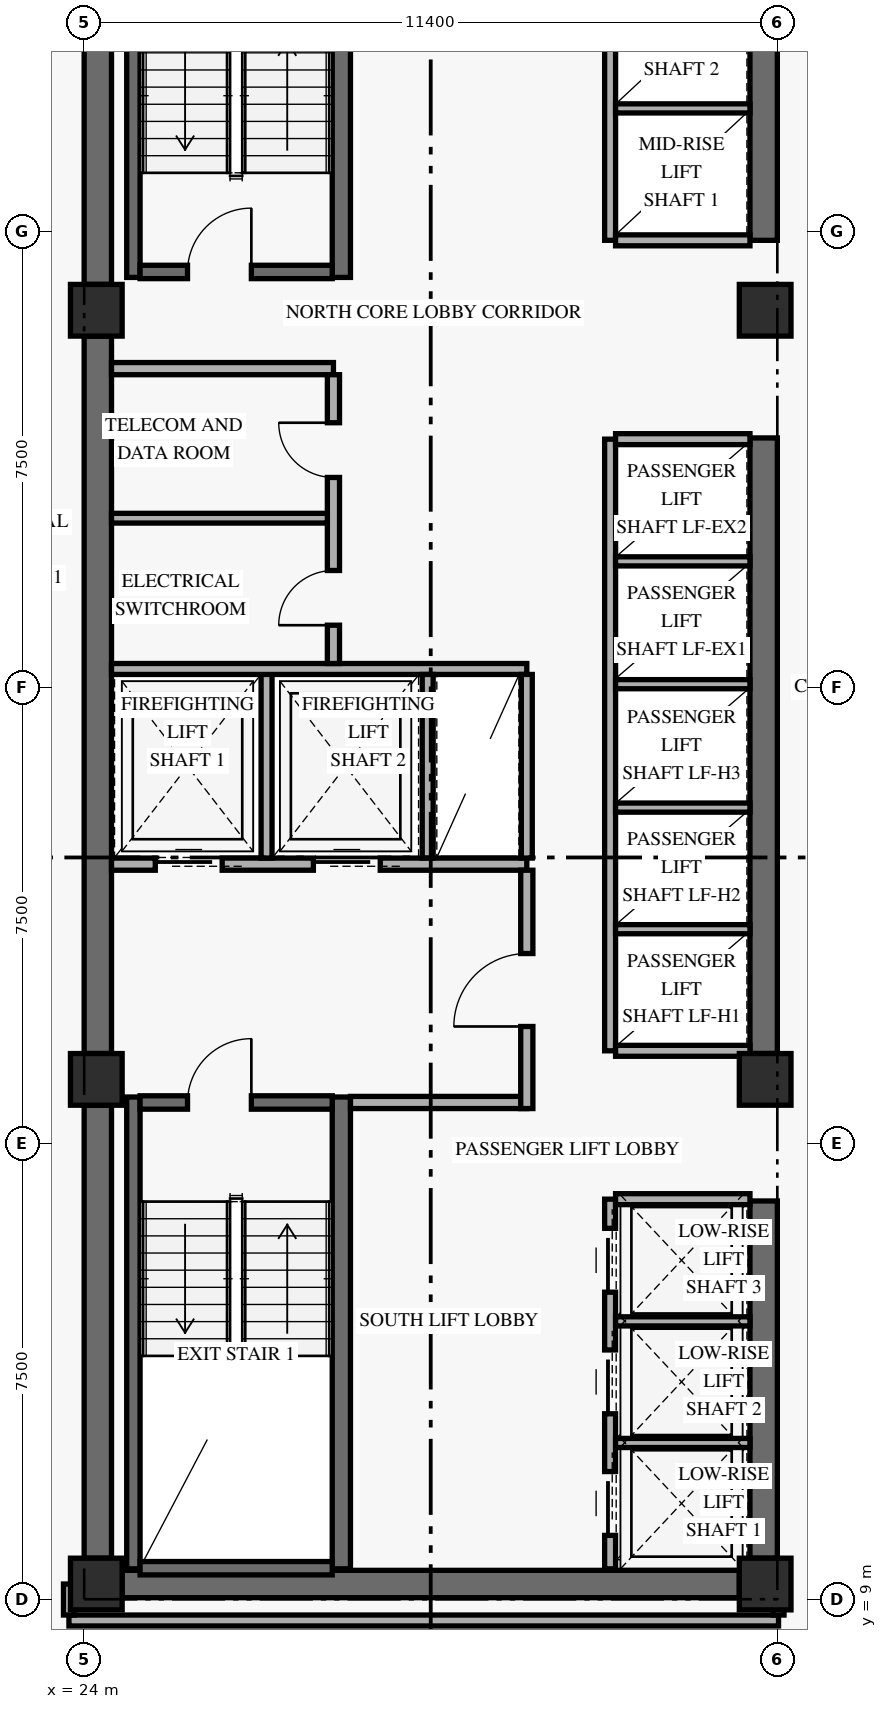
"""IFC4 building model, lengths in metres.
Left out: names, types, materials, properties, quantities, classifications, styles, units other than length and angle.
Written with IfcOpenShell. Run it as: python <this file> out.ifc"""

import sys

from ifc_helpers import new_model, si_unit, direction, frame, frame_2d, origin, origin_2d, place, context, subcontext, project, spatial, rectangle, extrude, element, fill, save


model = new_model("IFC4")
c1 = context("Model", 3, precision=1e-05, world=origin(), true_north=direction((0.0, 1.0)))
c2 = subcontext(c1, "Body", "Model", "MODEL_VIEW")
j1 = project(units=[si_unit("LENGTHUNIT", "METRE"), si_unit("PLANEANGLEUNIT", "RADIAN")], contexts=[c1])
p1 = place(None, origin())
s1 = spatial("IfcSite", under=j1, at=p1, CompositionType="ELEMENT")
p2 = place(p1, origin())
s2 = spatial("IfcBuilding", under=s1, at=p2, CompositionType="ELEMENT")
p3 = place(p2, frame((0.0, 0.0, 87.6)))
s3 = spatial("IfcBuildingStorey", under=s2, at=p3, CompositionType="ELEMENT", Elevation=87.6)
p4 = place(p3, frame((24.225, 9.675, 0.0), z_axis=(0.0, 0.0, 1.0), x_axis=(0.0, 1.0, 0.0)))
e1 = element("IfcWall", 1, at=p4, inside=s3, PredefinedType="SHEAR", context=c2, shape_type="SweptSolid", body=[
    extrude(rectangle(XDim=7.45, YDim=0.45, at=frame_2d((3.725, 0.0))), origin(), (0.0, 0.0, 1.0), 2.749),
])
p5 = place(p3, frame((24.225, 17.975, 0.0), z_axis=(0.0, 0.0, 1.0), x_axis=(0.0, 1.0, 0.0)))
e2 = element("IfcWall", 2, at=p5, inside=s3, PredefinedType="SHEAR", context=c2, shape_type="SweptSolid", body=[
    extrude(rectangle(XDim=11.8, YDim=0.45, at=frame_2d((5.9, 0.0))), origin(), (0.0, 0.0, 1.0), 2.749),
])
p6 = place(p3, frame((24.225, 30.625, 0.0), z_axis=(0.0, 0.0, 1.0), x_axis=(0.0, 1.0, 0.0)))
e3 = element("IfcWall", 3, at=p6, inside=s3, PredefinedType="SHEAR", context=c2, shape_type="SweptSolid", body=[
    extrude(rectangle(XDim=7.7, YDim=0.45, at=frame_2d((3.85, 0.0))), origin(), (0.0, 0.0, 1.0), 2.749),
])
p7 = place(p3, frame((35.175, 9.675, 0.0), z_axis=(0.0, 0.0, 1.0), x_axis=(0.0, 1.0, 0.0)))
e4 = element("IfcWall", 4, at=p7, inside=s3, PredefinedType="SHEAR", context=c2, shape_type="SweptSolid", body=[
    extrude(rectangle(XDim=5.875, YDim=0.45, at=frame_2d((2.938, 0.0))), origin(), (0.0, 0.0, 1.0), 2.749),
])
p8 = place(p3, frame((35.175, 17.975, 0.0), z_axis=(0.0, 0.0, 1.0), x_axis=(0.0, 1.0, 0.0)))
e5 = element("IfcWall", 5, at=p8, inside=s3, PredefinedType="SHEAR", context=c2, shape_type="SweptSolid", body=[
    extrude(rectangle(XDim=10.125, YDim=0.45, at=frame_2d((5.062, 0.0))), origin(), (0.0, 0.0, 1.0), 2.749),
])
p9 = place(p3, frame((35.175, 31.35, 0.0), z_axis=(0.0, 0.0, 1.0), x_axis=(0.0, 1.0, 0.0)))
e6 = element("IfcWall", 6, at=p9, inside=s3, PredefinedType="SHEAR", context=c2, shape_type="SweptSolid", body=[
    extrude(rectangle(XDim=6.975, YDim=0.45, at=frame_2d((3.487, 0.0))), origin(), (0.0, 0.0, 1.0), 2.749),
])
p10 = place(p3, frame((24.625, 9.25, 0.0), z_axis=(0.0, 0.0, 1.0), x_axis=(1.0, 0.0, 0.0)))
e7 = element("IfcWall", 7, at=p10, inside=s3, PredefinedType="SHEAR", context=c2, shape_type="SweptSolid", body=[
    extrude(rectangle(XDim=10.15, YDim=0.45, at=frame_2d((5.075, 0.0))), origin(), (0.0, 0.0, 1.0), 3.36),
])
p11 = place(p3, frame((24.81, 9.5, 0.0), z_axis=(0.0, 0.0, 1.0), x_axis=(0.0, 1.0, 0.0)))
e8 = element("IfcWall", 8, at=p11, inside=s3, PredefinedType="SHEAR", context=c2, shape_type="SweptSolid", body=[
    extrude(rectangle(XDim=7.76, YDim=0.22, at=frame_2d((3.88, 0.0))), origin(), (0.0, 0.0, 1.0), 3.36),
])
p12 = place(p3, frame((28.23, 9.5, 0.0), z_axis=(0.0, 0.0, 1.0), x_axis=(0.0, 1.0, 0.0)))
e9 = element("IfcWall", 9, at=p12, inside=s3, PredefinedType="SHEAR", context=c2, shape_type="SweptSolid", body=[
    extrude(rectangle(XDim=7.76, YDim=0.3, at=frame_2d((3.88, 0.0))), origin(), (0.0, 0.0, 1.0), 3.36),
])
p13 = place(p3, frame((24.92, 9.51, 0.0), z_axis=(0.0, 0.0, 1.0), x_axis=(1.0, 0.0, 0.0)))
e10 = element("IfcWall", 10, at=p13, inside=s3, PredefinedType="SHEAR", context=c2, shape_type="SweptSolid", body=[
    extrude(rectangle(XDim=3.16, YDim=0.22, at=frame_2d((1.58, 0.0))), origin(), (0.0, 0.0, 1.0), 3.36),
])
p14 = place(p3, frame((24.92, 17.17, 0.0), z_axis=(0.0, 0.0, 1.0), x_axis=(1.0, 0.0, 0.0)))
e11 = element("IfcWall", 11, at=p14, inside=s3, PredefinedType="SHEAR", context=c2, shape_type="SweptSolid", body=[
    extrude(rectangle(XDim=3.16, YDim=0.22, at=frame_2d((1.58, 0.0))), origin(), (0.0, 0.0, 1.0), 3.36),
])
p15 = place(p14, frame((0.78, 0.0, 0.0)))
e12 = element("IfcOpeningElement", 12, at=p15, cuts=e11, PredefinedType="OPENING", context=c2, shape_type="SweptSolid", body=[
    extrude(rectangle(XDim=1.05, YDim=2.15, at=frame_2d((0.525, 1.075))), frame((0.0, 0.12, 0.0), z_axis=(0.0, -1.0, 0.0), x_axis=(1.0, 0.0, 0.0)), (0.0, 0.0, 1.0), 0.24),
])
p16 = place(p3, frame((24.81, 30.74, 0.0), z_axis=(0.0, 0.0, 1.0), x_axis=(0.0, 1.0, 0.0)))
e13 = element("IfcWall", 13, at=p16, inside=s3, PredefinedType="SHEAR", context=c2, shape_type="SweptSolid", body=[
    extrude(rectangle(XDim=7.76, YDim=0.22, at=frame_2d((3.88, 0.0))), origin(), (0.0, 0.0, 1.0), 3.36),
])
p17 = place(p3, frame((28.23, 30.74, 0.0), z_axis=(0.0, 0.0, 1.0), x_axis=(0.0, 1.0, 0.0)))
e14 = element("IfcWall", 14, at=p17, inside=s3, PredefinedType="SHEAR", context=c2, shape_type="SweptSolid", body=[
    extrude(rectangle(XDim=7.76, YDim=0.3, at=frame_2d((3.88, 0.0))), origin(), (0.0, 0.0, 1.0), 3.36),
])
p18 = place(p3, frame((24.92, 30.83, 0.0), z_axis=(0.0, 0.0, 1.0), x_axis=(1.0, 0.0, 0.0)))
e15 = element("IfcWall", 15, at=p18, inside=s3, PredefinedType="SHEAR", context=c2, shape_type="SweptSolid", body=[
    extrude(rectangle(XDim=3.16, YDim=0.22, at=frame_2d((1.58, 0.0))), origin(), (0.0, 0.0, 1.0), 3.36),
])
p19 = place(p18, frame((0.78, 0.0, 0.0)))
e16 = element("IfcOpeningElement", 16, at=p19, cuts=e15, PredefinedType="OPENING", context=c2, shape_type="SweptSolid", body=[
    extrude(rectangle(XDim=1.05, YDim=2.15, at=frame_2d((0.525, 1.075))), frame((0.0, 0.12, 0.0), z_axis=(0.0, -1.0, 0.0), x_axis=(1.0, 0.0, 0.0)), (0.0, 0.0, 1.0), 0.24),
])
for number, where, z_axis, x_axis in (
    (17, (24.2, 9.25, 0.0), (0.0, 0.0, 1.0), (1.0, 0.0, 0.0)),
    (18, (24.2, 17.55, 0.0), (0.0, 0.0, 1.0), (1.0, 0.0, 0.0)),
    (19, (24.2, 30.2, 0.0), (0.0, 0.0, 1.0), (1.0, 0.0, 0.0)),
    (20, (35.2, 9.25, 0.0), (0.0, 0.0, 1.0), (1.0, 0.0, 0.0)),
    (21, (35.2, 17.55, 0.0), (0.0, 0.0, 1.0), (1.0, 0.0, 0.0)),
    (22, (35.2, 30.2, 0.0), (0.0, 0.0, 1.0), (1.0, 0.0, 0.0)),
):
    element("IfcColumn", number, at=place(p3, frame(where, z_axis=z_axis, x_axis=x_axis)), inside=s3, PredefinedType="COLUMN", context=c2, shape_type="SweptSolid", body=[
        extrude(rectangle(XDim=0.85, YDim=0.85, at=origin_2d()), origin(), (0.0, 0.0, 1.0), 3.6),
    ])
p20 = place(p3, frame((24.45, 21.09, 0.0), z_axis=(0.0, 0.0, 1.0), x_axis=(1.0, 0.0, 0.0)))
e23 = element("IfcWall", 23, at=p20, inside=s3, PredefinedType="STANDARD", context=c2, shape_type="SweptSolid", body=[
    extrude(rectangle(XDim=6.83, YDim=0.2, at=frame_2d((3.415, 0.0))), origin(), (0.0, 0.0, 1.0), 3.36),
])
p21 = place(p20, frame((0.72, 0.0, 0.0)))
e24 = element("IfcOpeningElement", 24, at=p21, cuts=e23, PredefinedType="OPENING", context=c2, shape_type="SweptSolid", body=[
    extrude(rectangle(XDim=1.1, YDim=2.2, at=frame_2d((0.55, 1.1))), frame((0.0, 0.11, 0.0), z_axis=(0.0, -1.0, 0.0), x_axis=(1.0, 0.0, 0.0)), (0.0, 0.0, 1.0), 0.22),
])
p22 = place(p20, frame((3.32, 0.0, 0.0)))
e25 = element("IfcOpeningElement", 25, at=p22, cuts=e23, PredefinedType="OPENING", context=c2, shape_type="SweptSolid", body=[
    extrude(rectangle(XDim=1.1, YDim=2.2, at=frame_2d((0.55, 1.1))), frame((0.0, 0.11, 0.0), z_axis=(0.0, -1.0, 0.0), x_axis=(1.0, 0.0, 0.0)), (0.0, 0.0, 1.0), 0.22),
])
p23 = place(p3, frame((28.38, 17.17, 0.0), z_axis=(0.0, 0.0, 1.0), x_axis=(1.0, 0.0, 0.0)))
e26 = element("IfcWall", 26, at=p23, inside=s3, PredefinedType="STANDARD", context=c2, shape_type="SweptSolid", body=[
    extrude(rectangle(XDim=2.9, YDim=0.2, at=frame_2d((1.45, 0.0))), origin(), (0.0, 0.0, 1.0), 3.36),
])
p24 = place(p3, frame((31.28, 17.07, 0.0), z_axis=(0.0, 0.0, 1.0), x_axis=(0.0, 1.0, 0.0)))
e27 = element("IfcWall", 27, at=p24, inside=s3, PredefinedType="STANDARD", context=c2, shape_type="SweptSolid", body=[
    extrude(rectangle(XDim=3.92, YDim=0.2, at=frame_2d((1.96, 0.0))), origin(), (0.0, 0.0, 1.0), 2.731),
])
p25 = place(p24, frame((1.35, 0.0, 0.0)))
e28 = element("IfcOpeningElement", 28, at=p25, cuts=e27, PredefinedType="OPENING", context=c2, shape_type="SweptSolid", body=[
    extrude(rectangle(XDim=1.2, YDim=2.15, at=frame_2d((0.6, 1.075))), frame((0.0, 0.11, 0.0), z_axis=(0.0, -1.0, 0.0), x_axis=(1.0, 0.0, 0.0)), (0.0, 0.0, 1.0), 0.22),
])
p26 = place(p3, frame((27.0, 21.19, 0.0), z_axis=(0.0, 0.0, 1.0), x_axis=(0.0, 1.0, 0.0)))
e29 = element("IfcWall", 29, at=p26, inside=s3, PredefinedType="STANDARD", context=c2, shape_type="SweptSolid", body=[
    extrude(rectangle(XDim=3.11, YDim=0.18, at=frame_2d((1.555, 0.0))), origin(), (0.0, 0.0, 1.0), 3.36),
])
p27 = place(p3, frame((24.45, 24.3, 0.0), z_axis=(0.0, 0.0, 1.0), x_axis=(1.0, 0.0, 0.0)))
e30 = element("IfcWall", 30, at=p27, inside=s3, PredefinedType="STANDARD", context=c2, shape_type="SweptSolid", body=[
    extrude(rectangle(XDim=6.83, YDim=0.18, at=frame_2d((3.415, 0.0))), origin(), (0.0, 0.0, 1.0), 3.36),
])
for number, where, z_axis, x_axis in (
    (31, (29.65, 21.19, 0.0), (0.0, 0.0, 1.0), (0.0, 1.0, 0.0)),
    (32, (31.28, 21.19, 0.0), (0.0, 0.0, 1.0), (0.0, 1.0, 0.0)),
):
    element("IfcWall", number, at=place(p3, frame(where, z_axis=z_axis, x_axis=x_axis)), inside=s3, PredefinedType="STANDARD", context=c2, shape_type="SweptSolid", body=[
        extrude(rectangle(XDim=3.02, YDim=0.18, at=frame_2d((1.51, 0.0))), origin(), (0.0, 0.0, 1.0), 3.36),
    ])
p28 = place(p3, frame((24.45, 29.24, 0.0), z_axis=(0.0, 0.0, 1.0), x_axis=(1.0, 0.0, 0.0)))
e33 = element("IfcWall", 33, at=p28, inside=s3, PredefinedType="STANDARD", context=c2, shape_type="SweptSolid", body=[
    extrude(rectangle(XDim=3.65, YDim=0.2, at=frame_2d((1.825, 0.0))), origin(), (0.0, 0.0, 1.0), 3.36),
])
p29 = place(p3, frame((28.1, 24.39, 0.0), z_axis=(0.0, 0.0, 1.0), x_axis=(0.0, 1.0, 0.0)))
e34 = element("IfcWall", 34, at=p29, inside=s3, PredefinedType="STANDARD", context=c2, shape_type="SweptSolid", body=[
    extrude(rectangle(XDim=4.75, YDim=0.2, at=frame_2d((2.375, 0.0))), origin(), (0.0, 0.0, 1.0), 3.36),
])
p30 = place(p29, frame((0.63, 0.0, 0.0)))
e35 = element("IfcOpeningElement", 35, at=p30, cuts=e34, PredefinedType="OPENING", context=c2, shape_type="SweptSolid", body=[
    extrude(rectangle(XDim=0.9, YDim=2.1, at=frame_2d((0.45, 1.05))), frame((0.0, 0.11, 0.0), z_axis=(0.0, -1.0, 0.0), x_axis=(1.0, 0.0, 0.0)), (0.0, 0.0, 1.0), 0.22),
])
p31 = place(p29, frame((3.06, 0.0, 0.0)))
e36 = element("IfcOpeningElement", 36, at=p31, cuts=e34, PredefinedType="OPENING", context=c2, shape_type="SweptSolid", body=[
    extrude(rectangle(XDim=0.9, YDim=2.1, at=frame_2d((0.45, 1.05))), frame((0.0, 0.11, 0.0), z_axis=(0.0, -1.0, 0.0), x_axis=(1.0, 0.0, 0.0)), (0.0, 0.0, 1.0), 0.22),
])
p32 = place(p3, frame((24.45, 26.78, 0.0), z_axis=(0.0, 0.0, 1.0), x_axis=(1.0, 0.0, 0.0)))
e37 = element("IfcWall", 37, at=p32, inside=s3, PredefinedType="PARTITIONING", context=c2, shape_type="SweptSolid", body=[
    extrude(rectangle(XDim=3.55, YDim=0.16, at=frame_2d((1.775, 0.0))), origin(), (0.0, 0.0, 1.0), 3.36),
])
p33 = place(p3, frame((32.65, 9.5, 0.0), z_axis=(0.0, 0.0, 1.0), x_axis=(0.0, 1.0, 0.0)))
e38 = element("IfcWall", 38, at=p33, inside=s3, PredefinedType="STANDARD", context=c2, shape_type="SweptSolid", body=[
    extrude(rectangle(XDim=6.08, YDim=0.18, at=frame_2d((3.04, 0.0))), origin(), (0.0, 0.0, 1.0), 3.36),
])
p34 = place(p33, frame((0.55, 0.0, 0.0)))
e39 = element("IfcOpeningElement", 39, at=p34, cuts=e38, PredefinedType="OPENING", context=c2, shape_type="SweptSolid", body=[
    extrude(rectangle(XDim=1.05, YDim=2.2, at=frame_2d((0.525, 1.1))), frame((0.0, 0.1, 0.0), z_axis=(0.0, -1.0, 0.0), x_axis=(1.0, 0.0, 0.0)), (0.0, 0.0, 1.0), 0.2),
])
p35 = place(p33, frame((2.55, 0.0, 0.0)))
e40 = element("IfcOpeningElement", 40, at=p35, cuts=e38, PredefinedType="OPENING", context=c2, shape_type="SweptSolid", body=[
    extrude(rectangle(XDim=1.05, YDim=2.2, at=frame_2d((0.525, 1.1))), frame((0.0, 0.1, 0.0), z_axis=(0.0, -1.0, 0.0), x_axis=(1.0, 0.0, 0.0)), (0.0, 0.0, 1.0), 0.2),
])
p36 = place(p33, frame((4.55, 0.0, 0.0)))
e41 = element("IfcOpeningElement", 41, at=p36, cuts=e38, PredefinedType="OPENING", context=c2, shape_type="SweptSolid", body=[
    extrude(rectangle(XDim=1.05, YDim=2.2, at=frame_2d((0.525, 1.1))), frame((0.0, 0.1, 0.0), z_axis=(0.0, -1.0, 0.0), x_axis=(1.0, 0.0, 0.0)), (0.0, 0.0, 1.0), 0.2),
])
p37 = place(p3, frame((32.74, 15.58, 0.0), z_axis=(0.0, 0.0, 1.0), x_axis=(1.0, 0.0, 0.0)))
e42 = element("IfcWall", 42, at=p37, inside=s3, PredefinedType="STANDARD", context=c2, shape_type="SweptSolid", body=[
    extrude(rectangle(XDim=2.21, YDim=0.18, at=frame_2d((1.105, 0.0))), origin(), (0.0, 0.0, 1.0), 3.36),
])
for number, where, z_axis, x_axis in (
    (43, (32.74, 11.57, 0.0), (0.0, 0.0, 1.0), (1.0, 0.0, 0.0)),
    (44, (32.74, 13.57, 0.0), (0.0, 0.0, 1.0), (1.0, 0.0, 0.0)),
):
    element("IfcWall", number, at=place(p3, frame(where, z_axis=z_axis, x_axis=x_axis)), inside=s3, PredefinedType="STANDARD", context=c2, shape_type="SweptSolid", body=[
        extrude(rectangle(XDim=2.21, YDim=0.15, at=frame_2d((1.105, 0.0))), origin(), (0.0, 0.0, 1.0), 3.36),
    ])
p38 = place(p3, frame((32.65, 18.02, 0.0), z_axis=(0.0, 0.0, 1.0), x_axis=(0.0, 1.0, 0.0)))
e45 = element("IfcWall", 45, at=p38, inside=s3, PredefinedType="STANDARD", context=c2, shape_type="SweptSolid", body=[
    extrude(rectangle(XDim=10.06, YDim=0.18, at=frame_2d((5.03, 0.0))), origin(), (0.0, 0.0, 1.0), 3.36),
])
for number, where, z_axis, x_axis in (
    (46, (32.74, 18.02, 0.0), (0.0, 0.0, 1.0), (1.0, 0.0, 0.0)),
    (47, (32.74, 28.08, 0.0), (0.0, 0.0, 1.0), (1.0, 0.0, 0.0)),
):
    element("IfcWall", number, at=place(p3, frame(where, z_axis=z_axis, x_axis=x_axis)), inside=s3, PredefinedType="STANDARD", context=c2, shape_type="SweptSolid", body=[
        extrude(rectangle(XDim=2.21, YDim=0.18, at=frame_2d((1.105, 0.0))), origin(), (0.0, 0.0, 1.0), 3.36),
    ])
for number, where, z_axis, x_axis in (
    (48, (32.74, 20.02, 0.0), (0.0, 0.0, 1.0), (1.0, 0.0, 0.0)),
    (49, (32.74, 22.02, 0.0), (0.0, 0.0, 1.0), (1.0, 0.0, 0.0)),
    (50, (32.74, 24.05, 0.0), (0.0, 0.0, 1.0), (1.0, 0.0, 0.0)),
    (51, (32.74, 26.07, 0.0), (0.0, 0.0, 1.0), (1.0, 0.0, 0.0)),
):
    element("IfcWall", number, at=place(p3, frame(where, z_axis=z_axis, x_axis=x_axis)), inside=s3, PredefinedType="STANDARD", context=c2, shape_type="SweptSolid", body=[
        extrude(rectangle(XDim=2.21, YDim=0.15, at=frame_2d((1.105, 0.0))), origin(), (0.0, 0.0, 1.0), 3.36),
    ])
p39 = place(p3, frame((32.65, 31.35, 0.0), z_axis=(0.0, 0.0, 1.0), x_axis=(0.0, 1.0, 0.0)))
e52 = element("IfcWall", 52, at=p39, inside=s3, PredefinedType="STANDARD", context=c2, shape_type="SweptSolid", body=[
    extrude(rectangle(XDim=7.175, YDim=0.18, at=frame_2d((3.587, 0.0))), origin(), (0.0, 0.0, 1.0), 3.36),
])
p40 = place(p3, frame((32.74, 31.35, 0.0), z_axis=(0.0, 0.0, 1.0), x_axis=(1.0, 0.0, 0.0)))
e53 = element("IfcWall", 53, at=p40, inside=s3, PredefinedType="STANDARD", context=c2, shape_type="SweptSolid", body=[
    extrude(rectangle(XDim=2.21, YDim=0.18, at=frame_2d((1.105, 0.0))), origin(), (0.0, 0.0, 1.0), 3.36),
])
p41 = place(p3, frame((32.74, 33.52, 0.0), z_axis=(0.0, 0.0, 1.0), x_axis=(1.0, 0.0, 0.0)))
e54 = element("IfcWall", 54, at=p41, inside=s3, PredefinedType="STANDARD", context=c2, shape_type="SweptSolid", body=[
    extrude(rectangle(XDim=2.21, YDim=0.15, at=frame_2d((1.105, 0.0))), origin(), (0.0, 0.0, 1.0), 3.36),
])
p42 = place(p3, frame((23.75, 8.65, 0.0), z_axis=(0.0, 0.0, 1.0), x_axis=(1.0, 0.0, 0.0)))
e55 = element("IfcWall", 55, at=p42, inside=s3, PredefinedType="STANDARD", context=c2, shape_type="SweptSolid", body=[
    extrude(rectangle(XDim=11.67, YDim=0.18, at=frame_2d((5.835, 0.0))), origin(), (0.0, 0.0, 1.0), 2.731),
])
for number, where, z_axis, x_axis in (
    (56, (35.42, 8.74, 0.0), (0.0, 0.0, 1.0), (0.0, 1.0, 0.0)),
    (57, (23.75, 8.74, 0.0), (0.0, 0.0, 1.0), (0.0, 1.0, 0.0)),
):
    element("IfcWall", number, at=place(p3, frame(where, z_axis=z_axis, x_axis=x_axis)), inside=s3, PredefinedType="STANDARD", context=c2, shape_type="SweptSolid", body=[
        extrude(rectangle(XDim=0.51, YDim=0.18, at=frame_2d((0.255, 0.0))), origin(), (0.0, 0.0, 1.0), 2.731),
    ])
p43 = place(p15, frame((1.05, 0.0, 0.0), z_axis=(0.0, 0.0, 1.0), x_axis=(-1.0, 0.0, 0.0)))
e58 = element("IfcDoor", 58, at=p43, inside=s3, OperationType="SINGLE_SWING_LEFT", PredefinedType="DOOR", context=c2, shape_type="SweptSolid", body=[
    extrude(rectangle(XDim=1.05, YDim=2.15, at=frame_2d((0.525, 1.075))), frame((0.0, 0.025, 0.0), z_axis=(0.0, -1.0, 0.0), x_axis=(1.0, 0.0, 0.0)), (0.0, 0.0, 1.0), 0.05),
])
fill(e12, e58)
p44 = place(p19, origin())
e59 = element("IfcDoor", 59, at=p44, inside=s3, OperationType="SINGLE_SWING_RIGHT", PredefinedType="DOOR", context=c2, shape_type="SweptSolid", body=[
    extrude(rectangle(XDim=1.05, YDim=2.15, at=frame_2d((0.525, 1.075))), frame((0.0, 0.025, 0.0), z_axis=(0.0, -1.0, 0.0), x_axis=(1.0, 0.0, 0.0)), (0.0, 0.0, 1.0), 0.05),
])
fill(e16, e59)
p45 = place(p21, origin())
e60 = element("IfcDoor", 60, at=p45, inside=s3, OperationType="SLIDING_TO_LEFT", PredefinedType="DOOR", context=c2, shape_type="SweptSolid", body=[
    extrude(rectangle(XDim=1.1, YDim=2.2, at=frame_2d((0.55, 1.1))), frame((0.0, 0.025, 0.0), z_axis=(0.0, -1.0, 0.0), x_axis=(1.0, 0.0, 0.0)), (0.0, 0.0, 1.0), 0.05),
])
fill(e24, e60)
p46 = place(p22, origin())
e61 = element("IfcDoor", 61, at=p46, inside=s3, OperationType="SLIDING_TO_LEFT", PredefinedType="DOOR", context=c2, shape_type="SweptSolid", body=[
    extrude(rectangle(XDim=1.1, YDim=2.2, at=frame_2d((0.55, 1.1))), frame((0.0, 0.025, 0.0), z_axis=(0.0, -1.0, 0.0), x_axis=(1.0, 0.0, 0.0)), (0.0, 0.0, 1.0), 0.05),
])
fill(e25, e61)
p47 = place(p25, origin())
e62 = element("IfcDoor", 62, at=p47, inside=s3, OperationType="SINGLE_SWING_LEFT", PredefinedType="DOOR", context=c2, shape_type="SweptSolid", body=[
    extrude(rectangle(XDim=1.2, YDim=2.15, at=frame_2d((0.6, 1.075))), frame((0.0, 0.025, 0.0), z_axis=(0.0, -1.0, 0.0), x_axis=(1.0, 0.0, 0.0)), (0.0, 0.0, 1.0), 0.05),
])
fill(e28, e62)
p48 = place(p30, origin())
e63 = element("IfcDoor", 63, at=p48, inside=s3, OperationType="SINGLE_SWING_LEFT", PredefinedType="DOOR", context=c2, shape_type="SweptSolid", body=[
    extrude(rectangle(XDim=0.9, YDim=2.1, at=frame_2d((0.45, 1.05))), frame((0.0, 0.025, 0.0), z_axis=(0.0, -1.0, 0.0), x_axis=(1.0, 0.0, 0.0)), (0.0, 0.0, 1.0), 0.05),
])
fill(e35, e63)
p49 = place(p31, origin())
e64 = element("IfcDoor", 64, at=p49, inside=s3, OperationType="SINGLE_SWING_RIGHT", PredefinedType="DOOR", context=c2, shape_type="SweptSolid", body=[
    extrude(rectangle(XDim=0.9, YDim=2.1, at=frame_2d((0.45, 1.05))), frame((0.0, 0.025, 0.0), z_axis=(0.0, -1.0, 0.0), x_axis=(1.0, 0.0, 0.0)), (0.0, 0.0, 1.0), 0.05),
])
fill(e36, e64)
p50 = place(p34, origin())
e65 = element("IfcDoor", 65, at=p50, inside=s3, OperationType="SLIDING_TO_LEFT", PredefinedType="DOOR", context=c2, shape_type="SweptSolid", body=[
    extrude(rectangle(XDim=1.05, YDim=2.2, at=frame_2d((0.525, 1.1))), frame((0.0, 0.025, 0.0), z_axis=(0.0, -1.0, 0.0), x_axis=(1.0, 0.0, 0.0)), (0.0, 0.0, 1.0), 0.05),
])
fill(e39, e65)
p51 = place(p35, origin())
e66 = element("IfcDoor", 66, at=p51, inside=s3, OperationType="SLIDING_TO_LEFT", PredefinedType="DOOR", context=c2, shape_type="SweptSolid", body=[
    extrude(rectangle(XDim=1.05, YDim=2.2, at=frame_2d((0.525, 1.1))), frame((0.0, 0.025, 0.0), z_axis=(0.0, -1.0, 0.0), x_axis=(1.0, 0.0, 0.0)), (0.0, 0.0, 1.0), 0.05),
])
fill(e40, e66)
p52 = place(p36, origin())
e67 = element("IfcDoor", 67, at=p52, inside=s3, OperationType="SLIDING_TO_LEFT", PredefinedType="DOOR", context=c2, shape_type="SweptSolid", body=[
    extrude(rectangle(XDim=1.05, YDim=2.2, at=frame_2d((0.525, 1.1))), frame((0.0, 0.025, 0.0), z_axis=(0.0, -1.0, 0.0), x_axis=(1.0, 0.0, 0.0)), (0.0, 0.0, 1.0), 0.05),
])
fill(e41, e67)
save(model, sys.argv[1])
